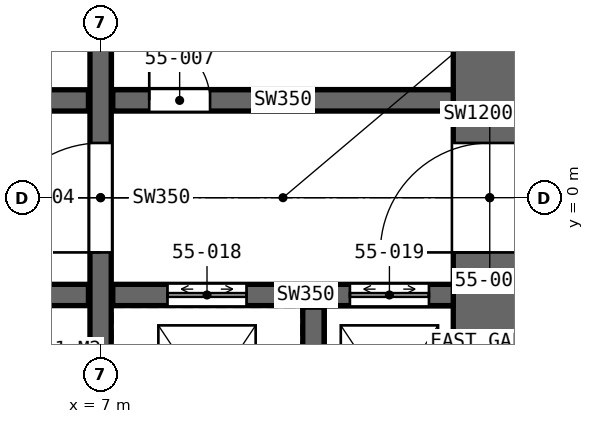
"""IFC4 building model, lengths in metres.
Left out: names, types, materials, properties, quantities, classifications, styles, units other than length and angle.
Written with IfcOpenShell. Run it as: python <this file> out.ifc"""

import sys

from ifc_helpers import new_model, si_unit, direction, frame, frame_2d, origin, place, context, subcontext, project, spatial, rectangle, extrude, element, fill, save


model = new_model("IFC4")
c1 = context("Model", 3, precision=1e-05, world=origin(), true_north=direction((0.0, 1.0)))
c2 = subcontext(c1, "Body", "Model", "MODEL_VIEW")
j1 = project(units=[si_unit("LENGTHUNIT", "METRE"), si_unit("PLANEANGLEUNIT", "RADIAN")], contexts=[c1])
p1 = place(None, origin())
s1 = spatial("IfcSite", under=j1, at=p1, CompositionType="ELEMENT")
p2 = place(p1, origin())
s2 = spatial("IfcBuilding", under=s1, at=p2, CompositionType="ELEMENT")
p3 = place(p2, frame((0.0, 0.0, 249.4)))
s3 = spatial("IfcBuildingStorey", under=s2, at=p3, CompositionType="ELEMENT", Elevation=249.4)
p4 = place(p3, frame((13.4, -8.8, 0.0), z_axis=(0.0, 0.0, 1.0), x_axis=(0.0, 1.0, 0.0)))
e1 = element("IfcWall", 1, at=p4, inside=s3, PredefinedType="SHEAR", context=c2, shape_type="SweptSolid", body=[
    extrude(rectangle(XDim=17.6, YDim=1.2, at=frame_2d((8.8, 0.0))), origin(), (0.0, 0.0, 1.0), 4.2),
])
p5 = place(p4, frame((7.9, 0.0, 0.0)))
e2 = element("IfcOpeningElement", 2, at=p5, cuts=e1, PredefinedType="OPENING", context=c2, shape_type="SweptSolid", body=[
    extrude(rectangle(XDim=1.8, YDim=2.4, at=frame_2d((0.9, 1.2))), frame((0.0, 0.61, 0.0), z_axis=(0.0, -1.0, 0.0), x_axis=(1.0, 0.0, 0.0)), (0.0, 0.0, 1.0), 1.22),
])
p6 = place(p3, frame((7.0, -8.8, 0.0), z_axis=(0.0, 0.0, 1.0), x_axis=(0.0, 1.0, 0.0)))
e3 = element("IfcWall", 3, at=p6, inside=s3, PredefinedType="SHEAR", context=c2, shape_type="SweptSolid", body=[
    extrude(rectangle(XDim=17.6, YDim=0.35, at=frame_2d((8.8, 0.0))), origin(), (0.0, 0.0, 1.0), 4.2),
])
p7 = place(p6, frame((7.9, 0.0, 0.0)))
e4 = element("IfcOpeningElement", 4, at=p7, cuts=e3, PredefinedType="OPENING", context=c2, shape_type="SweptSolid", body=[
    extrude(rectangle(XDim=1.8, YDim=2.4, at=frame_2d((0.9, 1.2))), frame((0.0, 0.185, 0.0), z_axis=(0.0, -1.0, 0.0), x_axis=(1.0, 0.0, 0.0)), (0.0, 0.0, 1.0), 0.37),
])
p8 = place(p3, frame((-6.8, 1.6, 0.0), z_axis=(0.0, 0.0, 1.0), x_axis=(1.0, 0.0, 0.0)))
e5 = element("IfcWall", 5, at=p8, inside=s3, PredefinedType="SHEAR", context=c2, shape_type="SweptSolid", body=[
    extrude(rectangle(XDim=13.6, YDim=0.35, at=frame_2d((6.8, 0.0))), origin(), (0.0, 0.0, 1.0), 4.2),
])
p9 = place(p8, frame((11.95, 0.0, 0.0)))
e6 = element("IfcOpeningElement", 6, at=p9, cuts=e5, PredefinedType="OPENING", context=c2, shape_type="SweptSolid", body=[
    extrude(rectangle(XDim=0.9, YDim=2.4, at=frame_2d((0.45, 1.2))), frame((0.0, 0.185, 0.0), z_axis=(0.0, -1.0, 0.0), x_axis=(1.0, 0.0, 0.0)), (0.0, 0.0, 1.0), 0.37),
])
p10 = place(p8, frame((4.5, 0.0, 0.0)))
e7 = element("IfcOpeningElement", 7, at=p10, cuts=e5, PredefinedType="OPENING", context=c2, shape_type="SweptSolid", body=[
    extrude(rectangle(XDim=1.8, YDim=2.4, at=frame_2d((0.9, 1.2))), frame((0.0, 0.185, 0.0), z_axis=(0.0, -1.0, 0.0), x_axis=(1.0, 0.0, 0.0)), (0.0, 0.0, 1.0), 0.37),
])
p11 = place(p3, frame((-6.8, -1.6, 0.0), z_axis=(0.0, 0.0, 1.0), x_axis=(1.0, 0.0, 0.0)))
e8 = element("IfcWall", 8, at=p11, inside=s3, PredefinedType="SHEAR", context=c2, shape_type="SweptSolid", body=[
    extrude(rectangle(XDim=13.6, YDim=0.35, at=frame_2d((6.8, 0.0))), origin(), (0.0, 0.0, 1.0), 4.2),
])
p12 = place(p11, frame((1.265, 0.0, 0.0)))
e9 = element("IfcOpeningElement", 9, at=p12, cuts=e8, PredefinedType="OPENING", context=c2, shape_type="SweptSolid", body=[
    extrude(rectangle(XDim=1.0, YDim=2.4, at=frame_2d((0.5, 1.2))), frame((0.0, 0.185, 0.0), z_axis=(0.0, -1.0, 0.0), x_axis=(1.0, 0.0, 0.0)), (0.0, 0.0, 1.0), 0.37),
])
p13 = place(p11, frame((4.95, 0.0, 0.0)))
e10 = element("IfcOpeningElement", 10, at=p13, cuts=e8, PredefinedType="OPENING", context=c2, shape_type="SweptSolid", body=[
    extrude(rectangle(XDim=1.1, YDim=2.4, at=frame_2d((0.55, 1.2))), frame((0.0, 0.185, 0.0), z_axis=(0.0, -1.0, 0.0), x_axis=(1.0, 0.0, 0.0)), (0.0, 0.0, 1.0), 0.37),
])
p14 = place(p11, frame((8.635, 0.0, 0.0)))
e11 = element("IfcOpeningElement", 11, at=p14, cuts=e8, PredefinedType="OPENING", context=c2, shape_type="SweptSolid", body=[
    extrude(rectangle(XDim=1.0, YDim=2.4, at=frame_2d((0.5, 1.2))), frame((0.0, 0.185, 0.0), z_axis=(0.0, -1.0, 0.0), x_axis=(1.0, 0.0, 0.0)), (0.0, 0.0, 1.0), 0.37),
])
p15 = place(p11, frame((11.9, 0.0, 0.0)))
e12 = element("IfcOpeningElement", 12, at=p15, cuts=e8, PredefinedType="OPENING", context=c2, shape_type="SweptSolid", body=[
    extrude(rectangle(XDim=1.0, YDim=2.4, at=frame_2d((0.5, 1.2))), frame((0.0, 0.185, 0.0), z_axis=(0.0, -1.0, 0.0), x_axis=(1.0, 0.0, 0.0)), (0.0, 0.0, 1.0), 0.37),
])
p16 = place(p3, frame((7.2, 1.6, 0.0), z_axis=(0.0, 0.0, 1.0), x_axis=(1.0, 0.0, 0.0)))
e13 = element("IfcWall", 13, at=p16, inside=s3, PredefinedType="SHEAR", context=c2, shape_type="SweptSolid", body=[
    extrude(rectangle(XDim=5.6, YDim=0.35, at=frame_2d((2.8, 0.0))), origin(), (0.0, 0.0, 1.0), 4.2),
])
p17 = place(p16, frame((0.6, 0.0, 0.0)))
e14 = element("IfcOpeningElement", 14, at=p17, cuts=e13, PredefinedType="OPENING", context=c2, shape_type="SweptSolid", body=[
    extrude(rectangle(XDim=1.0, YDim=2.4, at=frame_2d((0.5, 1.2))), frame((0.0, 0.185, 0.0), z_axis=(0.0, -1.0, 0.0), x_axis=(1.0, 0.0, 0.0)), (0.0, 0.0, 1.0), 0.37),
])
p18 = place(p3, frame((7.2, -1.6, 0.0), z_axis=(0.0, 0.0, 1.0), x_axis=(1.0, 0.0, 0.0)))
e15 = element("IfcWall", 15, at=p18, inside=s3, PredefinedType="SHEAR", context=c2, shape_type="SweptSolid", body=[
    extrude(rectangle(XDim=5.6, YDim=0.35, at=frame_2d((2.8, 0.0))), origin(), (0.0, 0.0, 1.0), 4.2),
])
p19 = place(p18, frame((0.9, 0.0, 0.0)))
e16 = element("IfcOpeningElement", 16, at=p19, cuts=e15, PredefinedType="OPENING", context=c2, shape_type="SweptSolid", body=[
    extrude(rectangle(XDim=1.3, YDim=2.4, at=frame_2d((0.65, 1.2))), frame((0.0, 0.185, 0.0), z_axis=(0.0, -1.0, 0.0), x_axis=(1.0, 0.0, 0.0)), (0.0, 0.0, 1.0), 0.37),
])
p20 = place(p18, frame((3.9, 0.0, 0.0)))
e17 = element("IfcOpeningElement", 17, at=p20, cuts=e15, PredefinedType="OPENING", context=c2, shape_type="SweptSolid", body=[
    extrude(rectangle(XDim=1.3, YDim=2.4, at=frame_2d((0.65, 1.2))), frame((0.0, 0.185, 0.0), z_axis=(0.0, -1.0, 0.0), x_axis=(1.0, 0.0, 0.0)), (0.0, 0.0, 1.0), 0.37),
])
p21 = place(p3, frame((10.5, -4.8, 0.0), z_axis=(0.0, 0.0, 1.0), x_axis=(0.0, 1.0, 0.0)))
e18 = element("IfcWall", 18, at=p21, inside=s3, PredefinedType="SHEAR", context=c2, shape_type="SweptSolid", body=[
    extrude(rectangle(XDim=3.0, YDim=0.35, at=frame_2d((1.5, 0.0))), origin(), (0.0, 0.0, 1.0), 4.2),
])
p22 = place(p5, origin())
e19 = element("IfcDoor", 19, at=p22, inside=s3, OperationType="DOUBLE_DOOR_SINGLE_SWING", PredefinedType="DOOR", context=c2, shape_type="SweptSolid", body=[
    extrude(rectangle(XDim=1.8, YDim=2.4, at=frame_2d((0.9, 1.2))), frame((0.0, 0.025, 0.0), z_axis=(0.0, -1.0, 0.0), x_axis=(1.0, 0.0, 0.0)), (0.0, 0.0, 1.0), 0.05),
])
fill(e2, e19)
p23 = place(p7, origin())
e20 = element("IfcDoor", 20, at=p23, inside=s3, OperationType="DOUBLE_DOOR_SINGLE_SWING", PredefinedType="DOOR", context=c2, shape_type="SweptSolid", body=[
    extrude(rectangle(XDim=1.8, YDim=2.4, at=frame_2d((0.9, 1.2))), frame((0.0, 0.025, 0.0), z_axis=(0.0, -1.0, 0.0), x_axis=(1.0, 0.0, 0.0)), (0.0, 0.0, 1.0), 0.05),
])
fill(e4, e20)
p24 = place(p17, origin())
e21 = element("IfcDoor", 21, at=p24, inside=s3, OperationType="SINGLE_SWING_LEFT", PredefinedType="DOOR", context=c2, shape_type="SweptSolid", body=[
    extrude(rectangle(XDim=1.0, YDim=2.4, at=frame_2d((0.5, 1.2))), frame((0.0, 0.025, 0.0), z_axis=(0.0, -1.0, 0.0), x_axis=(1.0, 0.0, 0.0)), (0.0, 0.0, 1.0), 0.05),
])
fill(e14, e21)
p25 = place(p19, origin())
e22 = element("IfcDoor", 22, at=p25, inside=s3, OperationType="DOUBLE_DOOR_SLIDING", PredefinedType="DOOR", context=c2, shape_type="SweptSolid", body=[
    extrude(rectangle(XDim=1.3, YDim=2.4, at=frame_2d((0.65, 1.2))), frame((0.0, 0.025, 0.0), z_axis=(0.0, -1.0, 0.0), x_axis=(1.0, 0.0, 0.0)), (0.0, 0.0, 1.0), 0.05),
])
fill(e16, e22)
p26 = place(p20, origin())
e23 = element("IfcDoor", 23, at=p26, inside=s3, OperationType="DOUBLE_DOOR_SLIDING", PredefinedType="DOOR", context=c2, shape_type="SweptSolid", body=[
    extrude(rectangle(XDim=1.3, YDim=2.4, at=frame_2d((0.65, 1.2))), frame((0.0, 0.025, 0.0), z_axis=(0.0, -1.0, 0.0), x_axis=(1.0, 0.0, 0.0)), (0.0, 0.0, 1.0), 0.05),
])
fill(e17, e23)
save(model, sys.argv[1])
